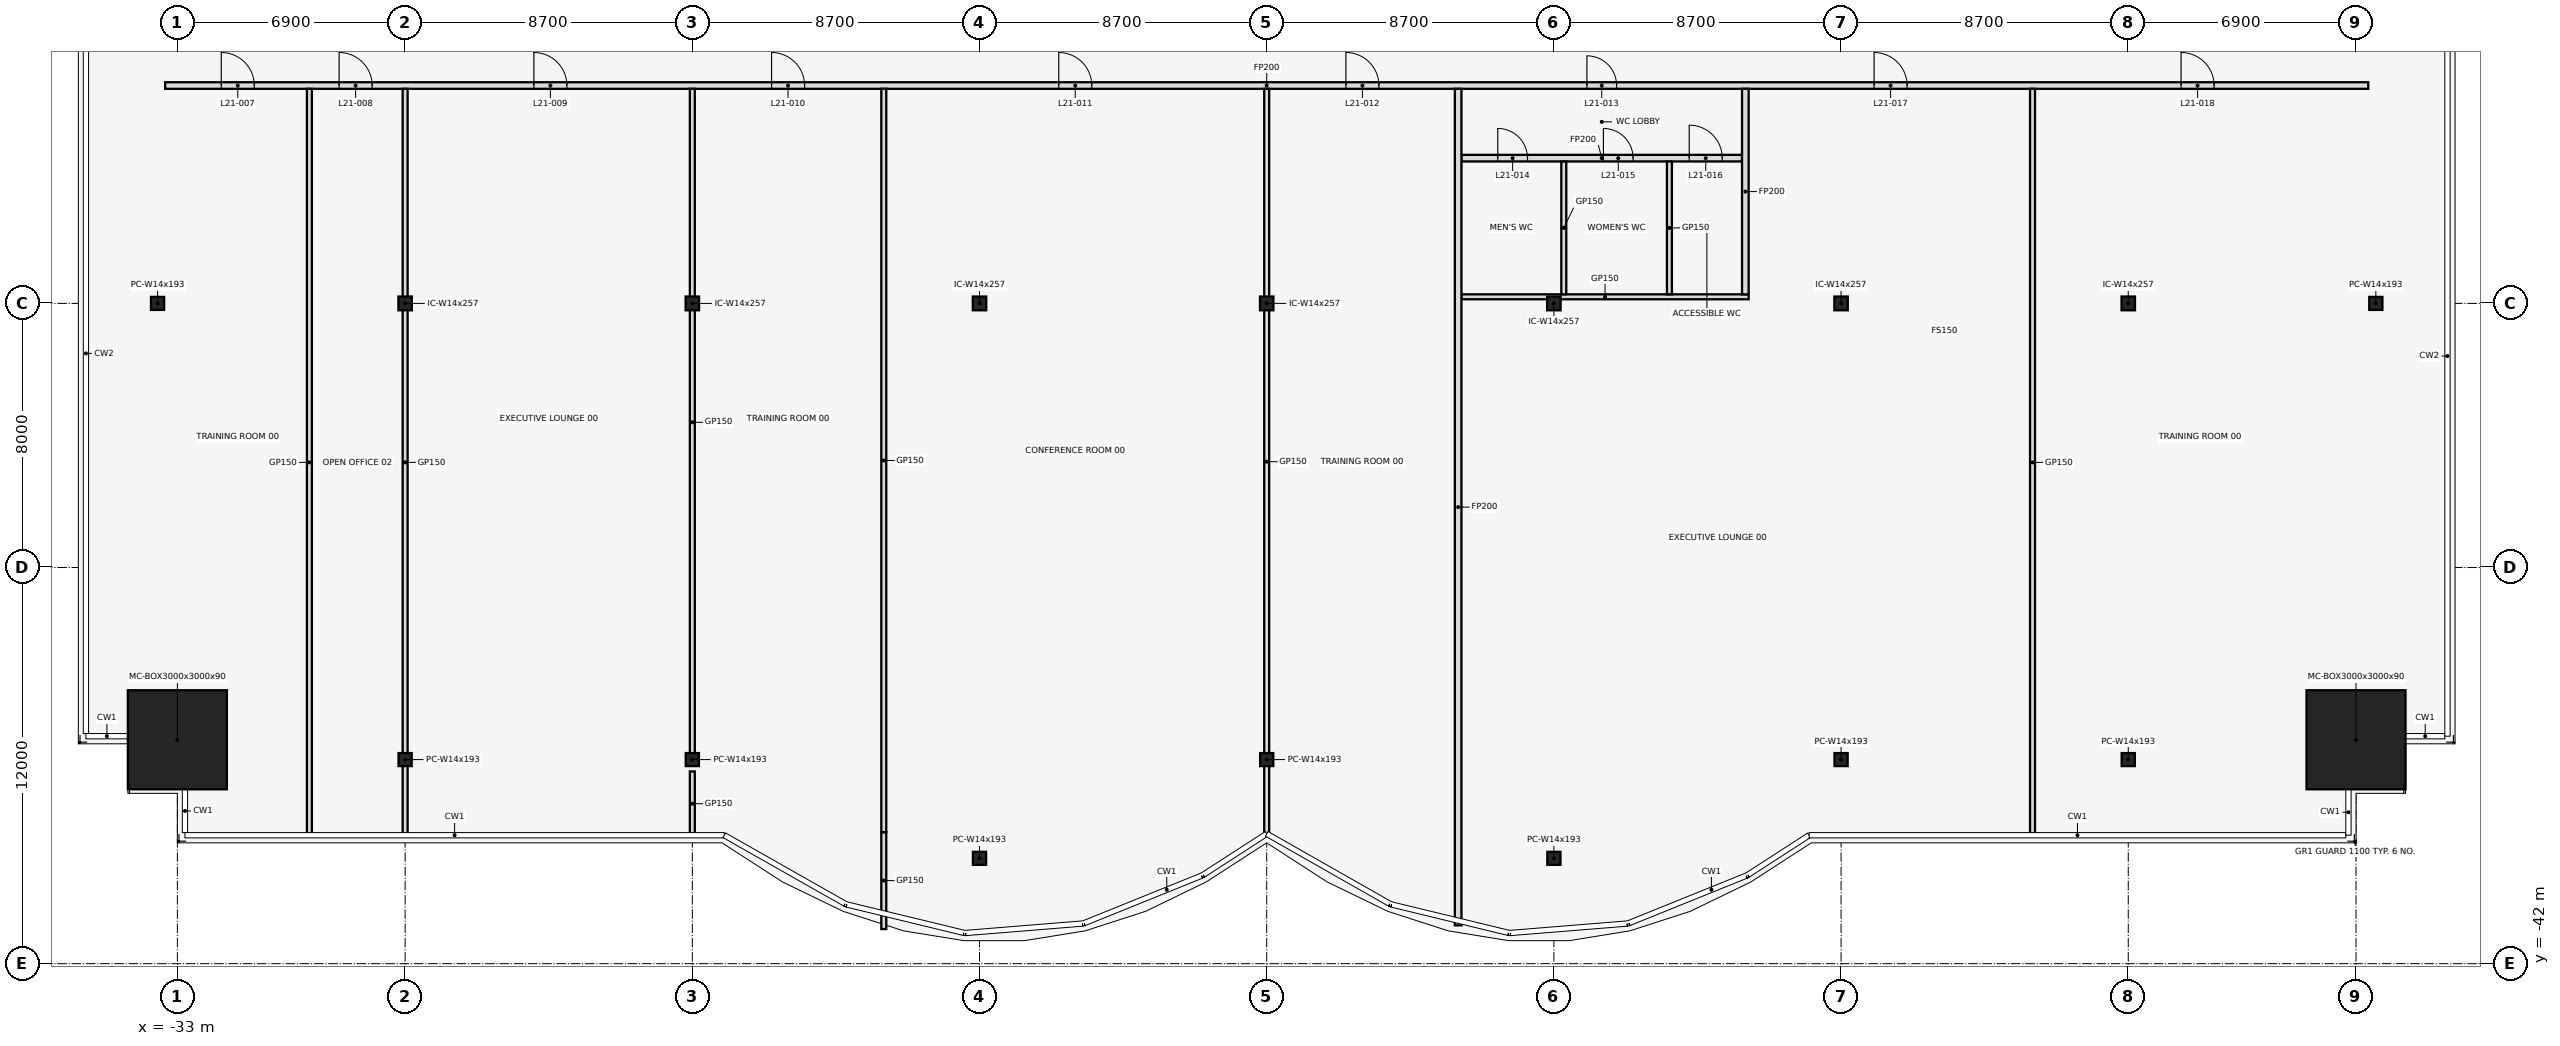
"""IFC4 building model, lengths in metres.
Left out: names, types, materials, properties, quantities, classifications, styles, units other than length and angle.
Written with IfcOpenShell. Run it as: python <this file> out.ifc"""

import sys

from ifc_helpers import new_model, si_unit, direction, frame, frame_2d, origin, origin_2d, place, context, subcontext, project, spatial, rectangle, hollow_rectangle, i_section, extrude, element, fill, save


model = new_model("IFC4")
c1 = context("Model", 3, precision=1e-05, world=origin(), true_north=direction((0.0, 1.0)))
c2 = subcontext(c1, "Body", "Model", "MODEL_VIEW")
j1 = project(units=[si_unit("LENGTHUNIT", "METRE"), si_unit("PLANEANGLEUNIT", "RADIAN")], contexts=[c1])
p1 = place(None, origin())
s1 = spatial("IfcSite", under=j1, at=p1, CompositionType="ELEMENT")
p2 = place(p1, origin())
s2 = spatial("IfcBuilding", under=s1, at=p2, CompositionType="ELEMENT")
p3 = place(p2, frame((0.0, 0.0, 102.2)))
s3 = spatial("IfcBuildingStorey", under=s2, at=p3, CompositionType="ELEMENT", Elevation=102.2)
p4 = place(p3, frame((-33.0, -35.218, 0.0), z_axis=(0.0, 0.0, 1.0), x_axis=(1.0, 0.0, 0.0)))
e1 = element("IfcColumn", 1, at=p4, inside=s3, PredefinedType="COLUMN", context=c2, shape_type="SweptSolid", body=[
    extrude(hollow_rectangle(XDim=3.0, YDim=3.0, WallThickness=0.09, at=origin_2d()), origin(), (0.0, 0.0, 1.0), 4.1),
])
for number, where, z_axis, x_axis in (
    (2, (-26.1, -35.818, 0.0), (0.0, 0.0, 1.0), (1.0, 0.0, 0.0)),
    (3, (-17.4, -35.818, 0.0), (0.0, 0.0, 1.0), (1.0, 0.0, 0.0)),
    (4, (-8.7, -38.809, 0.0), (0.0, 0.0, 1.0), (1.0, 0.0, 0.0)),
    (5, (0.0, -35.818, 0.0), (0.0, 0.0, 1.0), (1.0, 0.0, 0.0)),
    (6, (8.7, -38.809, 0.0), (0.0, 0.0, 1.0), (1.0, 0.0, 0.0)),
    (7, (17.4, -35.818, 0.0), (0.0, 0.0, 1.0), (1.0, 0.0, 0.0)),
    (8, (26.1, -35.818, 0.0), (0.0, 0.0, 1.0), (1.0, 0.0, 0.0)),
):
    element("IfcColumn", number, at=place(p3, frame(where, z_axis=z_axis, x_axis=x_axis)), inside=s3, PredefinedType="COLUMN", context=c2, shape_type="SweptSolid", body=[
        extrude(i_section(OverallWidth=0.399, OverallDepth=0.394, WebThickness=0.023, FlangeThickness=0.037, at=origin_2d()), origin(), (0.0, 0.0, 1.0), 4.1),
    ])
p5 = place(p3, frame((33.0, -35.218, 0.0), z_axis=(0.0, 0.0, 1.0), x_axis=(1.0, 0.0, 0.0)))
e9 = element("IfcColumn", 9, at=p5, inside=s3, PredefinedType="COLUMN", context=c2, shape_type="SweptSolid", body=[
    extrude(hollow_rectangle(XDim=3.0, YDim=3.0, WallThickness=0.09, at=origin_2d()), origin(), (0.0, 0.0, 1.0), 4.1),
])
for number, where, z_axis, x_axis in (
    (10, (-33.6, -22.0, 0.0), (0.0, 0.0, 1.0), (1.0, 0.0, 0.0)),
    (11, (33.6, -22.0, 0.0), (0.0, 0.0, 1.0), (1.0, 0.0, 0.0)),
):
    element("IfcColumn", number, at=place(p3, frame(where, z_axis=z_axis, x_axis=x_axis)), inside=s3, PredefinedType="COLUMN", context=c2, shape_type="SweptSolid", body=[
        extrude(i_section(OverallWidth=0.399, OverallDepth=0.394, WebThickness=0.023, FlangeThickness=0.037, at=origin_2d()), origin(), (0.0, 0.0, 1.0), 4.1),
    ])
for number, where, z_axis, x_axis in (
    (12, (-26.1, -22.0, 0.0), (0.0, 0.0, 1.0), (1.0, 0.0, 0.0)),
    (13, (-17.4, -22.0, 0.0), (0.0, 0.0, 1.0), (1.0, 0.0, 0.0)),
    (14, (-8.7, -22.0, 0.0), (0.0, 0.0, 1.0), (1.0, 0.0, 0.0)),
    (15, (0.0, -22.0, 0.0), (0.0, 0.0, 1.0), (1.0, 0.0, 0.0)),
    (16, (8.7, -22.0, 0.0), (0.0, 0.0, 1.0), (1.0, 0.0, 0.0)),
    (17, (17.4, -22.0, 0.0), (0.0, 0.0, 1.0), (1.0, 0.0, 0.0)),
    (18, (26.1, -22.0, 0.0), (0.0, 0.0, 1.0), (1.0, 0.0, 0.0)),
):
    element("IfcColumn", number, at=place(p3, frame(where, z_axis=z_axis, x_axis=x_axis)), inside=s3, PredefinedType="COLUMN", context=c2, shape_type="SweptSolid", body=[
        extrude(i_section(OverallWidth=0.406, OverallDepth=0.417, WebThickness=0.03, FlangeThickness=0.048, at=origin_2d()), origin(), (0.0, 0.0, 1.0), 4.1),
    ])
p6 = place(p3, frame((5.9, -21.8, 0.0), z_axis=(0.0, 0.0, 1.0), x_axis=(1.0, 0.0, 0.0)))
e19 = element("IfcWall", 19, at=p6, inside=s3, PredefinedType="PARTITIONING", context=c2, shape_type="SweptSolid", body=[
    extrude(rectangle(XDim=8.7, YDim=0.15, at=frame_2d((4.35, 0.0))), origin(), (0.0, 0.0, 1.0), 3.018),
])
p7 = place(p3, frame((5.9, -17.6, 0.0), z_axis=(0.0, 0.0, 1.0), x_axis=(1.0, 0.0, 0.0)))
e20 = element("IfcWall", 20, at=p7, inside=s3, PredefinedType="PARTITIONING", context=c2, shape_type="SweptSolid", body=[
    extrude(rectangle(XDim=8.5, YDim=0.2, at=frame_2d((4.25, 0.0))), origin(), (0.0, 0.0, 1.0), 3.018),
])
p8 = place(p7, frame((1.1, 0.0, 0.0)))
e21 = element("IfcOpeningElement", 21, at=p8, cuts=e20, PredefinedType="OPENING", context=c2, shape_type="SweptSolid", body=[
    extrude(rectangle(XDim=0.9, YDim=2.1, at=frame_2d((0.45, 1.05))), frame((0.0, 0.112, 0.0), z_axis=(0.0, -1.0, 0.0), x_axis=(1.0, 0.0, 0.0)), (0.0, 0.0, 1.0), 0.224),
])
p9 = place(p7, frame((4.3, 0.0, 0.0)))
e22 = element("IfcOpeningElement", 22, at=p9, cuts=e20, PredefinedType="OPENING", context=c2, shape_type="SweptSolid", body=[
    extrude(rectangle(XDim=0.9, YDim=2.1, at=frame_2d((0.45, 1.05))), frame((0.0, 0.112, 0.0), z_axis=(0.0, -1.0, 0.0), x_axis=(1.0, 0.0, 0.0)), (0.0, 0.0, 1.0), 0.224),
])
p10 = place(p7, frame((6.9, 0.0, 0.0)))
e23 = element("IfcOpeningElement", 23, at=p10, cuts=e20, PredefinedType="OPENING", context=c2, shape_type="SweptSolid", body=[
    extrude(rectangle(XDim=1.0, YDim=2.1, at=frame_2d((0.5, 1.05))), frame((0.0, 0.112, 0.0), z_axis=(0.0, -1.0, 0.0), x_axis=(1.0, 0.0, 0.0)), (0.0, 0.0, 1.0), 0.224),
])
p11 = place(p3, frame((-33.37, -15.4, 0.0), z_axis=(0.0, 0.0, 1.0), x_axis=(1.0, 0.0, 0.0)))
e24 = element("IfcWall", 24, at=p11, inside=s3, PredefinedType="PARTITIONING", context=c2, shape_type="SweptSolid", body=[
    extrude(rectangle(XDim=66.74, YDim=0.2, at=frame_2d((33.37, 0.0))), origin(), (0.0, 0.0, 1.0), 3.018),
])
p12 = place(p11, frame((1.7, 0.0, 0.0)))
e25 = element("IfcOpeningElement", 25, at=p12, cuts=e24, PredefinedType="OPENING", context=c2, shape_type="SweptSolid", body=[
    extrude(rectangle(XDim=1.0, YDim=2.1, at=frame_2d((0.5, 1.05))), frame((0.0, 0.112, 0.0), z_axis=(0.0, -1.0, 0.0), x_axis=(1.0, 0.0, 0.0)), (0.0, 0.0, 1.0), 0.224),
])
p13 = place(p11, frame((5.27, 0.0, 0.0)))
e26 = element("IfcOpeningElement", 26, at=p13, cuts=e24, PredefinedType="OPENING", context=c2, shape_type="SweptSolid", body=[
    extrude(rectangle(XDim=1.0, YDim=2.1, at=frame_2d((0.5, 1.05))), frame((0.0, 0.112, 0.0), z_axis=(0.0, -1.0, 0.0), x_axis=(1.0, 0.0, 0.0)), (0.0, 0.0, 1.0), 0.224),
])
p14 = place(p11, frame((11.17, 0.0, 0.0)))
e27 = element("IfcOpeningElement", 27, at=p14, cuts=e24, PredefinedType="OPENING", context=c2, shape_type="SweptSolid", body=[
    extrude(rectangle(XDim=1.0, YDim=2.1, at=frame_2d((0.5, 1.05))), frame((0.0, 0.112, 0.0), z_axis=(0.0, -1.0, 0.0), x_axis=(1.0, 0.0, 0.0)), (0.0, 0.0, 1.0), 0.224),
])
p15 = place(p11, frame((18.37, 0.0, 0.0)))
e28 = element("IfcOpeningElement", 28, at=p15, cuts=e24, PredefinedType="OPENING", context=c2, shape_type="SweptSolid", body=[
    extrude(rectangle(XDim=1.0, YDim=2.1, at=frame_2d((0.5, 1.05))), frame((0.0, 0.112, 0.0), z_axis=(0.0, -1.0, 0.0), x_axis=(1.0, 0.0, 0.0)), (0.0, 0.0, 1.0), 0.224),
])
p16 = place(p11, frame((27.07, 0.0, 0.0)))
e29 = element("IfcOpeningElement", 29, at=p16, cuts=e24, PredefinedType="OPENING", context=c2, shape_type="SweptSolid", body=[
    extrude(rectangle(XDim=1.0, YDim=2.1, at=frame_2d((0.5, 1.05))), frame((0.0, 0.112, 0.0), z_axis=(0.0, -1.0, 0.0), x_axis=(1.0, 0.0, 0.0)), (0.0, 0.0, 1.0), 0.224),
])
p17 = place(p11, frame((35.77, 0.0, 0.0)))
e30 = element("IfcOpeningElement", 30, at=p17, cuts=e24, PredefinedType="OPENING", context=c2, shape_type="SweptSolid", body=[
    extrude(rectangle(XDim=1.0, YDim=2.1, at=frame_2d((0.5, 1.05))), frame((0.0, 0.112, 0.0), z_axis=(0.0, -1.0, 0.0), x_axis=(1.0, 0.0, 0.0)), (0.0, 0.0, 1.0), 0.224),
])
p18 = place(p11, frame((43.07, 0.0, 0.0)))
e31 = element("IfcOpeningElement", 31, at=p18, cuts=e24, PredefinedType="OPENING", context=c2, shape_type="SweptSolid", body=[
    extrude(rectangle(XDim=0.9, YDim=2.1, at=frame_2d((0.45, 1.05))), frame((0.0, 0.112, 0.0), z_axis=(0.0, -1.0, 0.0), x_axis=(1.0, 0.0, 0.0)), (0.0, 0.0, 1.0), 0.224),
])
p19 = place(p11, frame((51.77, 0.0, 0.0)))
e32 = element("IfcOpeningElement", 32, at=p19, cuts=e24, PredefinedType="OPENING", context=c2, shape_type="SweptSolid", body=[
    extrude(rectangle(XDim=1.0, YDim=2.1, at=frame_2d((0.5, 1.05))), frame((0.0, 0.112, 0.0), z_axis=(0.0, -1.0, 0.0), x_axis=(1.0, 0.0, 0.0)), (0.0, 0.0, 1.0), 0.224),
])
p20 = place(p11, frame((61.07, 0.0, 0.0)))
e33 = element("IfcOpeningElement", 33, at=p20, cuts=e24, PredefinedType="OPENING", context=c2, shape_type="SweptSolid", body=[
    extrude(rectangle(XDim=1.0, YDim=2.1, at=frame_2d((0.5, 1.05))), frame((0.0, 0.112, 0.0), z_axis=(0.0, -1.0, 0.0), x_axis=(1.0, 0.0, 0.0)), (0.0, 0.0, 1.0), 0.224),
])
for number, where, z_axis, x_axis in (
    (34, (-29.0, -38.13, 0.0), (0.0, 0.0, 1.0), (0.0, 1.0, 0.0)),
    (35, (-26.1, -38.13, 0.0), (0.0, 0.0, 1.0), (0.0, 1.0, 0.0)),
):
    element("IfcWall", number, at=place(p3, frame(where, z_axis=z_axis, x_axis=x_axis)), inside=s3, PredefinedType="PARTITIONING", context=c2, shape_type="SweptSolid", body=[
        extrude(rectangle(XDim=22.63, YDim=0.15, at=frame_2d((11.315, 0.0))), origin(), (0.0, 0.0, 1.0), 3.018),
    ])
p21 = place(p3, frame((-17.4, -38.13, 0.0), z_axis=(0.0, 0.0, 1.0), x_axis=(0.0, 1.0, 0.0)))
e36 = element("IfcWall", 36, at=p21, inside=s3, PredefinedType="PARTITIONING", context=c2, shape_type="SweptSolid", body=[
    extrude(rectangle(XDim=1.953, YDim=0.15, at=frame_2d((0.976, 0.0))), origin(), (0.0, 0.0, 1.0), 3.018),
])
p22 = place(p3, frame((-17.4, -35.703, 0.0), z_axis=(0.0, 0.0, 1.0), x_axis=(0.0, 1.0, 0.0)))
e37 = element("IfcWall", 37, at=p22, inside=s3, PredefinedType="PARTITIONING", context=c2, shape_type="SweptSolid", body=[
    extrude(rectangle(XDim=20.203, YDim=0.15, at=frame_2d((10.101, 0.0))), origin(), (0.0, 0.0, 1.0), 3.018),
])
p23 = place(p3, frame((-11.6, -40.952, 0.0), z_axis=(0.0, 0.0, 1.0), x_axis=(0.0, 1.0, 0.0)))
e38 = element("IfcWall", 38, at=p23, inside=s3, PredefinedType="PARTITIONING", context=c2, shape_type="SweptSolid", body=[
    extrude(rectangle(XDim=2.937, YDim=0.15, at=frame_2d((1.469, 0.0))), origin(), (0.0, 0.0, 1.0), 3.018),
])
p24 = place(p3, frame((-11.6, -38.015, 0.0), z_axis=(0.0, 0.0, 1.0), x_axis=(0.0, 1.0, 0.0)))
e39 = element("IfcWall", 39, at=p24, inside=s3, PredefinedType="PARTITIONING", context=c2, shape_type="SweptSolid", body=[
    extrude(rectangle(XDim=22.515, YDim=0.15, at=frame_2d((11.258, 0.0))), origin(), (0.0, 0.0, 1.0), 3.018),
])
p25 = place(p3, frame((0.0, -38.09, 0.0), z_axis=(0.0, 0.0, 1.0), x_axis=(0.0, 1.0, 0.0)))
e40 = element("IfcWall", 40, at=p25, inside=s3, PredefinedType="PARTITIONING", context=c2, shape_type="SweptSolid", body=[
    extrude(rectangle(XDim=22.59, YDim=0.15, at=frame_2d((11.295, 0.0))), origin(), (0.0, 0.0, 1.0), 3.018),
])
p26 = place(p3, frame((5.8, -40.84, 0.0), z_axis=(0.0, 0.0, 1.0), x_axis=(0.0, 1.0, 0.0)))
e41 = element("IfcWall", 41, at=p26, inside=s3, PredefinedType="PARTITIONING", context=c2, shape_type="SweptSolid", body=[
    extrude(rectangle(XDim=25.34, YDim=0.2, at=frame_2d((12.67, 0.0))), origin(), (0.0, 0.0, 1.0), 3.018),
])
for number, where, z_axis, x_axis in (
    (42, (9.0, -21.725, 0.0), (0.0, 0.0, 1.0), (0.0, 1.0, 0.0)),
    (43, (12.2, -21.725, 0.0), (0.0, 0.0, 1.0), (0.0, 1.0, 0.0)),
):
    element("IfcWall", number, at=place(p3, frame(where, z_axis=z_axis, x_axis=x_axis)), inside=s3, PredefinedType="PARTITIONING", context=c2, shape_type="SweptSolid", body=[
        extrude(rectangle(XDim=4.025, YDim=0.15, at=frame_2d((2.013, 0.0))), origin(), (0.0, 0.0, 1.0), 3.018),
    ])
p27 = place(p3, frame((14.5, -21.725, 0.0), z_axis=(0.0, 0.0, 1.0), x_axis=(0.0, 1.0, 0.0)))
e44 = element("IfcWall", 44, at=p27, inside=s3, PredefinedType="PARTITIONING", context=c2, shape_type="SweptSolid", body=[
    extrude(rectangle(XDim=6.225, YDim=0.2, at=frame_2d((3.113, 0.0))), origin(), (0.0, 0.0, 1.0), 3.018),
])
p28 = place(p3, frame((23.2, -38.13, 0.0), z_axis=(0.0, 0.0, 1.0), x_axis=(0.0, 1.0, 0.0)))
e45 = element("IfcWall", 45, at=p28, inside=s3, PredefinedType="PARTITIONING", context=c2, shape_type="SweptSolid", body=[
    extrude(rectangle(XDim=22.63, YDim=0.15, at=frame_2d((11.315, 0.0))), origin(), (0.0, 0.0, 1.0), 3.018),
])
p29 = place(p12, frame((1.0, 0.0, 0.0), z_axis=(0.0, 0.0, 1.0), x_axis=(-1.0, 0.0, 0.0)))
e46 = element("IfcDoor", 46, at=p29, inside=s3, OperationType="SINGLE_SWING_LEFT", PredefinedType="DOOR", context=c2, shape_type="SweptSolid", body=[
    extrude(rectangle(XDim=1.0, YDim=2.1, at=frame_2d((0.5, 1.05))), frame((0.0, 0.025, 0.0), z_axis=(0.0, -1.0, 0.0), x_axis=(1.0, 0.0, 0.0)), (0.0, 0.0, 1.0), 0.05),
])
fill(e25, e46)
p30 = place(p13, frame((1.0, 0.0, 0.0), z_axis=(0.0, 0.0, 1.0), x_axis=(-1.0, 0.0, 0.0)))
e47 = element("IfcDoor", 47, at=p30, inside=s3, OperationType="SINGLE_SWING_RIGHT", PredefinedType="DOOR", context=c2, shape_type="SweptSolid", body=[
    extrude(rectangle(XDim=1.0, YDim=2.1, at=frame_2d((0.5, 1.05))), frame((0.0, 0.025, 0.0), z_axis=(0.0, -1.0, 0.0), x_axis=(1.0, 0.0, 0.0)), (0.0, 0.0, 1.0), 0.05),
])
fill(e26, e47)
p31 = place(p14, frame((1.0, 0.0, 0.0), z_axis=(0.0, 0.0, 1.0), x_axis=(-1.0, 0.0, 0.0)))
e48 = element("IfcDoor", 48, at=p31, inside=s3, OperationType="SINGLE_SWING_RIGHT", PredefinedType="DOOR", context=c2, shape_type="SweptSolid", body=[
    extrude(rectangle(XDim=1.0, YDim=2.1, at=frame_2d((0.5, 1.05))), frame((0.0, 0.025, 0.0), z_axis=(0.0, -1.0, 0.0), x_axis=(1.0, 0.0, 0.0)), (0.0, 0.0, 1.0), 0.05),
])
fill(e27, e48)
p32 = place(p15, frame((1.0, 0.0, 0.0), z_axis=(0.0, 0.0, 1.0), x_axis=(-1.0, 0.0, 0.0)))
e49 = element("IfcDoor", 49, at=p32, inside=s3, OperationType="SINGLE_SWING_LEFT", PredefinedType="DOOR", context=c2, shape_type="SweptSolid", body=[
    extrude(rectangle(XDim=1.0, YDim=2.1, at=frame_2d((0.5, 1.05))), frame((0.0, 0.025, 0.0), z_axis=(0.0, -1.0, 0.0), x_axis=(1.0, 0.0, 0.0)), (0.0, 0.0, 1.0), 0.05),
])
fill(e28, e49)
p33 = place(p16, frame((1.0, 0.0, 0.0), z_axis=(0.0, 0.0, 1.0), x_axis=(-1.0, 0.0, 0.0)))
e50 = element("IfcDoor", 50, at=p33, inside=s3, OperationType="SINGLE_SWING_RIGHT", PredefinedType="DOOR", context=c2, shape_type="SweptSolid", body=[
    extrude(rectangle(XDim=1.0, YDim=2.1, at=frame_2d((0.5, 1.05))), frame((0.0, 0.025, 0.0), z_axis=(0.0, -1.0, 0.0), x_axis=(1.0, 0.0, 0.0)), (0.0, 0.0, 1.0), 0.05),
])
fill(e29, e50)
p34 = place(p17, frame((1.0, 0.0, 0.0), z_axis=(0.0, 0.0, 1.0), x_axis=(-1.0, 0.0, 0.0)))
e51 = element("IfcDoor", 51, at=p34, inside=s3, OperationType="SINGLE_SWING_RIGHT", PredefinedType="DOOR", context=c2, shape_type="SweptSolid", body=[
    extrude(rectangle(XDim=1.0, YDim=2.1, at=frame_2d((0.5, 1.05))), frame((0.0, 0.025, 0.0), z_axis=(0.0, -1.0, 0.0), x_axis=(1.0, 0.0, 0.0)), (0.0, 0.0, 1.0), 0.05),
])
fill(e30, e51)
p35 = place(p18, frame((0.9, 0.0, 0.0), z_axis=(0.0, 0.0, 1.0), x_axis=(-1.0, 0.0, 0.0)))
e52 = element("IfcDoor", 52, at=p35, inside=s3, OperationType="SINGLE_SWING_LEFT", PredefinedType="DOOR", context=c2, shape_type="SweptSolid", body=[
    extrude(rectangle(XDim=0.9, YDim=2.1, at=frame_2d((0.45, 1.05))), frame((0.0, 0.025, 0.0), z_axis=(0.0, -1.0, 0.0), x_axis=(1.0, 0.0, 0.0)), (0.0, 0.0, 1.0), 0.05),
])
fill(e31, e52)
p36 = place(p8, frame((0.9, 0.0, 0.0), z_axis=(0.0, 0.0, 1.0), x_axis=(-1.0, 0.0, 0.0)))
e53 = element("IfcDoor", 53, at=p36, inside=s3, OperationType="SINGLE_SWING_RIGHT", PredefinedType="DOOR", context=c2, shape_type="SweptSolid", body=[
    extrude(rectangle(XDim=0.9, YDim=2.1, at=frame_2d((0.45, 1.05))), frame((0.0, 0.025, 0.0), z_axis=(0.0, -1.0, 0.0), x_axis=(1.0, 0.0, 0.0)), (0.0, 0.0, 1.0), 0.05),
])
fill(e21, e53)
p37 = place(p9, frame((0.9, 0.0, 0.0), z_axis=(0.0, 0.0, 1.0), x_axis=(-1.0, 0.0, 0.0)))
e54 = element("IfcDoor", 54, at=p37, inside=s3, OperationType="SINGLE_SWING_RIGHT", PredefinedType="DOOR", context=c2, shape_type="SweptSolid", body=[
    extrude(rectangle(XDim=0.9, YDim=2.1, at=frame_2d((0.45, 1.05))), frame((0.0, 0.025, 0.0), z_axis=(0.0, -1.0, 0.0), x_axis=(1.0, 0.0, 0.0)), (0.0, 0.0, 1.0), 0.05),
])
fill(e22, e54)
p38 = place(p10, frame((1.0, 0.0, 0.0), z_axis=(0.0, 0.0, 1.0), x_axis=(-1.0, 0.0, 0.0)))
e55 = element("IfcDoor", 55, at=p38, inside=s3, OperationType="SINGLE_SWING_LEFT", PredefinedType="DOOR", context=c2, shape_type="SweptSolid", body=[
    extrude(rectangle(XDim=1.0, YDim=2.1, at=frame_2d((0.5, 1.05))), frame((0.0, 0.025, 0.0), z_axis=(0.0, -1.0, 0.0), x_axis=(1.0, 0.0, 0.0)), (0.0, 0.0, 1.0), 0.05),
])
fill(e23, e55)
p39 = place(p19, frame((1.0, 0.0, 0.0), z_axis=(0.0, 0.0, 1.0), x_axis=(-1.0, 0.0, 0.0)))
e56 = element("IfcDoor", 56, at=p39, inside=s3, OperationType="SINGLE_SWING_RIGHT", PredefinedType="DOOR", context=c2, shape_type="SweptSolid", body=[
    extrude(rectangle(XDim=1.0, YDim=2.1, at=frame_2d((0.5, 1.05))), frame((0.0, 0.025, 0.0), z_axis=(0.0, -1.0, 0.0), x_axis=(1.0, 0.0, 0.0)), (0.0, 0.0, 1.0), 0.05),
])
fill(e32, e56)
p40 = place(p20, frame((1.0, 0.0, 0.0), z_axis=(0.0, 0.0, 1.0), x_axis=(-1.0, 0.0, 0.0)))
e57 = element("IfcDoor", 57, at=p40, inside=s3, OperationType="SINGLE_SWING_RIGHT", PredefinedType="DOOR", context=c2, shape_type="SweptSolid", body=[
    extrude(rectangle(XDim=1.0, YDim=2.1, at=frame_2d((0.5, 1.05))), frame((0.0, 0.025, 0.0), z_axis=(0.0, -1.0, 0.0), x_axis=(1.0, 0.0, 0.0)), (0.0, 0.0, 1.0), 0.05),
])
fill(e33, e57)
save(model, sys.argv[1])
